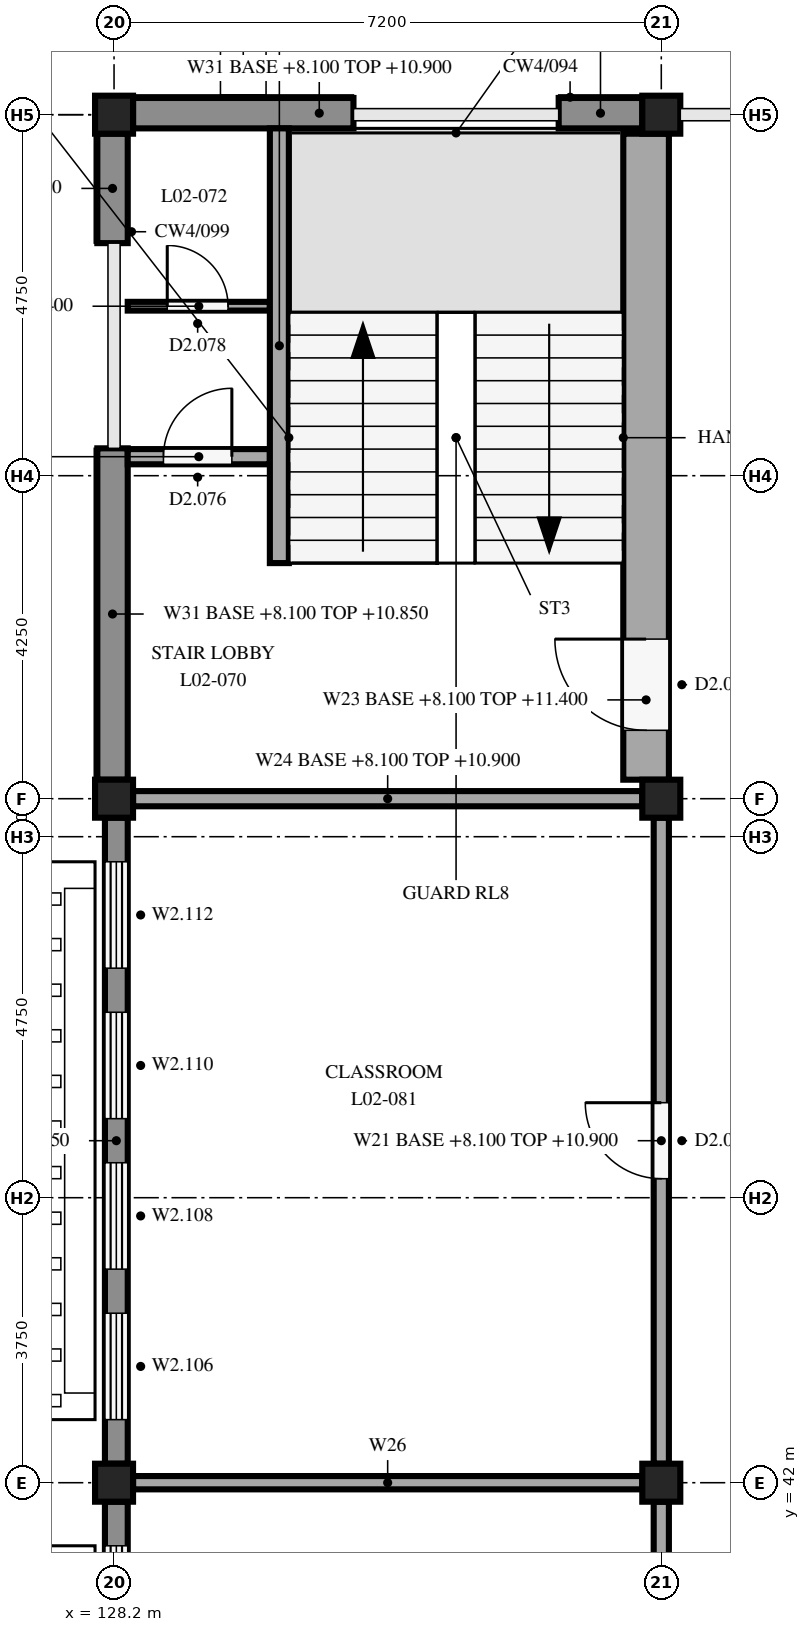
"""IFC4 building model, lengths in metres.
Left out: names, types, materials, properties, quantities, classifications, styles, units other than length and angle.
Written with IfcOpenShell. Run it as: python <this file> out.ifc"""

import sys

from ifc_helpers import new_model, si_unit, direction, frame, frame_2d, origin, origin_2d, place, context, subcontext, project, spatial, rectangle, extrude, element, fill, save


model = new_model("IFC4")
c1 = context("Model", 3, precision=1e-05, world=origin(), true_north=direction((0.0, 1.0)))
c2 = subcontext(c1, "Body", "Model", "MODEL_VIEW")
j1 = project(units=[si_unit("LENGTHUNIT", "METRE"), si_unit("PLANEANGLEUNIT", "RADIAN")], contexts=[c1])
p1 = place(None, origin())
s1 = spatial("IfcSite", under=j1, at=p1, CompositionType="ELEMENT")
p2 = place(p1, origin())
s2 = spatial("IfcBuilding", under=s1, at=p2, CompositionType="ELEMENT")
p3 = place(p2, frame((0.0, 0.0, 8.1)))
s3 = spatial("IfcBuildingStorey", under=s2, at=p3, CompositionType="ELEMENT", Elevation=8.1)
for number, where, z_axis, x_axis in (
    (1, (128.2, 42.0, 0.0), (0.0, 0.0, 1.0), (1.0, 0.0, 0.0)),
    (2, (128.2, 51.0, 0.0), (0.0, 0.0, 1.0), (1.0, 0.0, 0.0)),
    (3, (128.2, 60.0, 0.0), (0.0, 0.0, 1.0), (1.0, 0.0, 0.0)),
    (4, (135.4, 42.0, 0.0), (0.0, 0.0, 1.0), (1.0, 0.0, 0.0)),
    (5, (135.4, 51.0, 0.0), (0.0, 0.0, 1.0), (1.0, 0.0, 0.0)),
    (6, (135.4, 60.0, 0.0), (0.0, 0.0, 1.0), (1.0, 0.0, 0.0)),
):
    element("IfcColumn", number, at=place(p3, frame(where, z_axis=z_axis, x_axis=x_axis)), inside=s3, PredefinedType="COLUMN", context=c2, shape_type="SweptSolid", body=[
        extrude(rectangle(XDim=0.5, YDim=0.5, at=origin_2d()), origin(), (0.0, 0.0, 1.0), 3.3),
    ])
p4 = place(p3, frame((128.23, 33.25, 0.0), z_axis=(0.0, 0.0, 1.0), x_axis=(0.0, 1.0, 0.0)))
e7 = element("IfcWall", 7, at=p4, inside=s3, PredefinedType="STANDARD", context=c2, shape_type="SweptSolid", body=[
    extrude(rectangle(XDim=8.5, YDim=0.3, at=frame_2d((4.25, 0.0))), origin(), (0.0, 0.0, 1.0), 2.75),
])
p5 = place(p4, frame((0.58, 0.0, 0.6)))
e8 = element("IfcOpeningElement", 8, at=p5, cuts=e7, PredefinedType="OPENING", context=c2, shape_type="SweptSolid", body=[
    extrude(rectangle(XDim=1.4, YDim=2.1, at=frame_2d((0.7, 1.05))), frame((0.0, 0.16, 0.0), z_axis=(0.0, -1.0, 0.0), x_axis=(1.0, 0.0, 0.0)), (0.0, 0.0, 1.0), 0.32),
])
p6 = place(p4, frame((2.56, 0.0, 0.6)))
e9 = element("IfcOpeningElement", 9, at=p6, cuts=e7, PredefinedType="OPENING", context=c2, shape_type="SweptSolid", body=[
    extrude(rectangle(XDim=1.4, YDim=2.1, at=frame_2d((0.7, 1.05))), frame((0.0, 0.16, 0.0), z_axis=(0.0, -1.0, 0.0), x_axis=(1.0, 0.0, 0.0)), (0.0, 0.0, 1.0), 0.32),
])
p7 = place(p4, frame((4.54, 0.0, 0.6)))
e10 = element("IfcOpeningElement", 10, at=p7, cuts=e7, PredefinedType="OPENING", context=c2, shape_type="SweptSolid", body=[
    extrude(rectangle(XDim=1.4, YDim=2.1, at=frame_2d((0.7, 1.05))), frame((0.0, 0.16, 0.0), z_axis=(0.0, -1.0, 0.0), x_axis=(1.0, 0.0, 0.0)), (0.0, 0.0, 1.0), 0.32),
])
p8 = place(p4, frame((6.52, 0.0, 0.6)))
e11 = element("IfcOpeningElement", 11, at=p8, cuts=e7, PredefinedType="OPENING", context=c2, shape_type="SweptSolid", body=[
    extrude(rectangle(XDim=1.4, YDim=2.1, at=frame_2d((0.7, 1.05))), frame((0.0, 0.16, 0.0), z_axis=(0.0, -1.0, 0.0), x_axis=(1.0, 0.0, 0.0)), (0.0, 0.0, 1.0), 0.32),
])
p9 = place(p3, frame((128.23, 42.25, 0.0), z_axis=(0.0, 0.0, 1.0), x_axis=(0.0, 1.0, 0.0)))
e12 = element("IfcWall", 12, at=p9, inside=s3, PredefinedType="STANDARD", context=c2, shape_type="SweptSolid", body=[
    extrude(rectangle(XDim=8.5, YDim=0.3, at=frame_2d((4.25, 0.0))), origin(), (0.0, 0.0, 1.0), 2.75),
])
p10 = place(p9, frame((0.58, 0.0, 0.6)))
e13 = element("IfcOpeningElement", 13, at=p10, cuts=e12, PredefinedType="OPENING", context=c2, shape_type="SweptSolid", body=[
    extrude(rectangle(XDim=1.4, YDim=2.1, at=frame_2d((0.7, 1.05))), frame((0.0, 0.16, 0.0), z_axis=(0.0, -1.0, 0.0), x_axis=(1.0, 0.0, 0.0)), (0.0, 0.0, 1.0), 0.32),
])
p11 = place(p9, frame((2.56, 0.0, 0.6)))
e14 = element("IfcOpeningElement", 14, at=p11, cuts=e12, PredefinedType="OPENING", context=c2, shape_type="SweptSolid", body=[
    extrude(rectangle(XDim=1.4, YDim=2.1, at=frame_2d((0.7, 1.05))), frame((0.0, 0.16, 0.0), z_axis=(0.0, -1.0, 0.0), x_axis=(1.0, 0.0, 0.0)), (0.0, 0.0, 1.0), 0.32),
])
p12 = place(p9, frame((4.54, 0.0, 0.6)))
e15 = element("IfcOpeningElement", 15, at=p12, cuts=e12, PredefinedType="OPENING", context=c2, shape_type="SweptSolid", body=[
    extrude(rectangle(XDim=1.4, YDim=2.1, at=frame_2d((0.7, 1.05))), frame((0.0, 0.16, 0.0), z_axis=(0.0, -1.0, 0.0), x_axis=(1.0, 0.0, 0.0)), (0.0, 0.0, 1.0), 0.32),
])
p13 = place(p9, frame((6.52, 0.0, 0.6)))
e16 = element("IfcOpeningElement", 16, at=p13, cuts=e12, PredefinedType="OPENING", context=c2, shape_type="SweptSolid", body=[
    extrude(rectangle(XDim=1.4, YDim=2.1, at=frame_2d((0.7, 1.05))), frame((0.0, 0.16, 0.0), z_axis=(0.0, -1.0, 0.0), x_axis=(1.0, 0.0, 0.0)), (0.0, 0.0, 1.0), 0.32),
])
p14 = place(p3, frame((128.18, 51.25, 0.0), z_axis=(0.0, 0.0, 1.0), x_axis=(0.0, 1.0, 0.0)))
e17 = element("IfcWall", 17, at=p14, inside=s3, PredefinedType="STANDARD", context=c2, shape_type="SweptSolid", body=[
    extrude(rectangle(XDim=4.36, YDim=0.4, at=frame_2d((2.18, 0.0))), origin(), (0.0, 0.0, 1.0), 2.75),
])
p15 = place(p3, frame((128.18, 58.31, 0.0), z_axis=(0.0, 0.0, 1.0), x_axis=(0.0, 1.0, 0.0)))
e18 = element("IfcWall", 18, at=p15, inside=s3, PredefinedType="STANDARD", context=c2, shape_type="SweptSolid", body=[
    extrude(rectangle(XDim=1.44, YDim=0.4, at=frame_2d((0.72, 0.0))), origin(), (0.0, 0.0, 1.0), 2.75),
])
p16 = place(p3, frame((128.45, 60.02, 0.0), z_axis=(0.0, 0.0, 1.0), x_axis=(1.0, 0.0, 0.0)))
e19 = element("IfcWall", 19, at=p16, inside=s3, PredefinedType="STANDARD", context=c2, shape_type="SweptSolid", body=[
    extrude(rectangle(XDim=2.9, YDim=0.4, at=frame_2d((1.45, 0.0))), origin(), (0.0, 0.0, 1.0), 2.8),
])
p17 = place(p3, frame((134.05, 60.02, 0.0), z_axis=(0.0, 0.0, 1.0), x_axis=(1.0, 0.0, 0.0)))
e20 = element("IfcWall", 20, at=p17, inside=s3, PredefinedType="STANDARD", context=c2, shape_type="SweptSolid", body=[
    extrude(rectangle(XDim=1.1, YDim=0.4, at=frame_2d((0.55, 0.0))), origin(), (0.0, 0.0, 1.0), 2.8),
])
p18 = place(p3, frame((130.375, 54.1, 0.0), z_axis=(0.0, 0.0, 1.0), x_axis=(0.0, 1.0, 0.0)))
e21 = element("IfcWall", 21, at=p18, inside=s3, PredefinedType="SOLIDWALL", context=c2, shape_type="SweptSolid", body=[
    extrude(rectangle(XDim=5.72, YDim=0.25, at=frame_2d((2.86, 0.0))), origin(), (0.0, 0.0, 1.0), 3.3),
])
p19 = place(p3, frame((135.2, 51.25, 0.0), z_axis=(0.0, 0.0, 1.0), x_axis=(0.0, 1.0, 0.0)))
e22 = element("IfcWall", 22, at=p19, inside=s3, PredefinedType="SOLIDWALL", context=c2, shape_type="SweptSolid", body=[
    extrude(rectangle(XDim=8.5, YDim=0.6, at=frame_2d((4.25, 0.0))), origin(), (0.0, 0.0, 1.0), 3.3),
])
p20 = place(p19, frame((0.65, 0.0, 0.0)))
e23 = element("IfcOpeningElement", 23, at=p20, cuts=e22, PredefinedType="OPENING", context=c2, shape_type="SweptSolid", body=[
    extrude(rectangle(XDim=1.2, YDim=2.1, at=frame_2d((0.6, 1.05))), frame((0.0, 0.31, 0.0), z_axis=(0.0, -1.0, 0.0), x_axis=(1.0, 0.0, 0.0)), (0.0, 0.0, 1.0), 0.62),
])
p21 = place(p3, frame((128.38, 55.5, 0.0), z_axis=(0.0, 0.0, 1.0), x_axis=(1.0, 0.0, 0.0)))
e24 = element("IfcWall", 24, at=p21, inside=s3, PredefinedType="SOLIDWALL", context=c2, shape_type="SweptSolid", body=[
    extrude(rectangle(XDim=1.87, YDim=0.2, at=frame_2d((0.935, 0.0))), origin(), (0.0, 0.0, 1.0), 3.3),
])
p22 = place(p21, frame((0.47, 0.0, 0.0)))
e25 = element("IfcOpeningElement", 25, at=p22, cuts=e24, PredefinedType="OPENING", context=c2, shape_type="SweptSolid", body=[
    extrude(rectangle(XDim=0.9, YDim=2.1, at=frame_2d((0.45, 1.05))), frame((0.0, 0.11, 0.0), z_axis=(0.0, -1.0, 0.0), x_axis=(1.0, 0.0, 0.0)), (0.0, 0.0, 1.0), 0.22),
])
p23 = place(p3, frame((128.38, 57.48, 0.0), z_axis=(0.0, 0.0, 1.0), x_axis=(1.0, 0.0, 0.0)))
e26 = element("IfcWall", 26, at=p23, inside=s3, PredefinedType="PARTITIONING", context=c2, shape_type="SweptSolid", body=[
    extrude(rectangle(XDim=1.87, YDim=0.115, at=frame_2d((0.935, 0.0))), origin(), (0.0, 0.0, 1.0), 3.3),
])
p24 = place(p23, frame((0.52, 0.0, 0.0)))
e27 = element("IfcOpeningElement", 27, at=p24, cuts=e26, PredefinedType="OPENING", context=c2, shape_type="SweptSolid", body=[
    extrude(rectangle(XDim=0.8, YDim=2.1, at=frame_2d((0.4, 1.05))), frame((0.0, 0.067, 0.0), z_axis=(0.0, -1.0, 0.0), x_axis=(1.0, 0.0, 0.0)), (0.0, 0.0, 1.0), 0.135),
])
p25 = place(p3, frame((128.45, 51.0, 0.0), z_axis=(0.0, 0.0, 1.0), x_axis=(1.0, 0.0, 0.0)))
e28 = element("IfcWall", 28, at=p25, inside=s3, PredefinedType="SOLIDWALL", context=c2, shape_type="SweptSolid", body=[
    extrude(rectangle(XDim=6.7, YDim=0.2, at=frame_2d((3.35, 0.0))), origin(), (0.0, 0.0, 1.0), 2.8),
])
p26 = place(p3, frame((135.4, 33.25, 0.0), z_axis=(0.0, 0.0, 1.0), x_axis=(0.0, 1.0, 0.0)))
e29 = element("IfcWall", 29, at=p26, inside=s3, PredefinedType="PARTITIONING", context=c2, shape_type="SweptSolid", body=[
    extrude(rectangle(XDim=8.5, YDim=0.2, at=frame_2d((4.25, 0.0))), origin(), (0.0, 0.0, 1.0), 2.8),
])
p27 = place(p26, frame((3.75, 0.0, 0.0)))
e30 = element("IfcOpeningElement", 30, at=p27, cuts=e29, PredefinedType="OPENING", context=c2, shape_type="SweptSolid", body=[
    extrude(rectangle(XDim=1.0, YDim=2.1, at=frame_2d((0.5, 1.05))), frame((0.0, 0.11, 0.0), z_axis=(0.0, -1.0, 0.0), x_axis=(1.0, 0.0, 0.0)), (0.0, 0.0, 1.0), 0.22),
])
p28 = place(p3, frame((135.4, 42.25, 0.0), z_axis=(0.0, 0.0, 1.0), x_axis=(0.0, 1.0, 0.0)))
e31 = element("IfcWall", 31, at=p28, inside=s3, PredefinedType="PARTITIONING", context=c2, shape_type="SweptSolid", body=[
    extrude(rectangle(XDim=8.5, YDim=0.2, at=frame_2d((4.25, 0.0))), origin(), (0.0, 0.0, 1.0), 2.8),
])
p29 = place(p28, frame((3.75, 0.0, 0.0)))
e32 = element("IfcOpeningElement", 32, at=p29, cuts=e31, PredefinedType="OPENING", context=c2, shape_type="SweptSolid", body=[
    extrude(rectangle(XDim=1.0, YDim=2.1, at=frame_2d((0.5, 1.05))), frame((0.0, 0.11, 0.0), z_axis=(0.0, -1.0, 0.0), x_axis=(1.0, 0.0, 0.0)), (0.0, 0.0, 1.0), 0.22),
])
p30 = place(p3, frame((128.45, 42.0, 0.0), z_axis=(0.0, 0.0, 1.0), x_axis=(1.0, 0.0, 0.0)))
e33 = element("IfcWall", 33, at=p30, inside=s3, PredefinedType="PARTITIONING", context=c2, shape_type="SweptSolid", body=[
    extrude(rectangle(XDim=6.7, YDim=0.175, at=frame_2d((3.35, 0.0))), origin(), (0.0, 0.0, 1.0), 2.8),
])
p31 = place(p8, origin())
e34 = element("IfcWindow", 34, at=p31, inside=s3, PartitioningType="DOUBLE_PANEL_VERTICAL", PredefinedType="WINDOW", context=c2, shape_type="SweptSolid", body=[
    extrude(rectangle(XDim=1.4, YDim=2.1, at=frame_2d((0.7, 1.05))), frame((0.0, 0.03, 0.0), z_axis=(0.0, -1.0, 0.0), x_axis=(1.0, 0.0, 0.0)), (0.0, 0.0, 1.0), 0.06),
])
fill(e11, e34)
p32 = place(p10, origin())
e35 = element("IfcWindow", 35, at=p32, inside=s3, PartitioningType="DOUBLE_PANEL_VERTICAL", PredefinedType="WINDOW", context=c2, shape_type="SweptSolid", body=[
    extrude(rectangle(XDim=1.4, YDim=2.1, at=frame_2d((0.7, 1.05))), frame((0.0, 0.03, 0.0), z_axis=(0.0, -1.0, 0.0), x_axis=(1.0, 0.0, 0.0)), (0.0, 0.0, 1.0), 0.06),
])
fill(e13, e35)
p33 = place(p11, origin())
e36 = element("IfcWindow", 36, at=p33, inside=s3, PartitioningType="DOUBLE_PANEL_VERTICAL", PredefinedType="WINDOW", context=c2, shape_type="SweptSolid", body=[
    extrude(rectangle(XDim=1.4, YDim=2.1, at=frame_2d((0.7, 1.05))), frame((0.0, 0.03, 0.0), z_axis=(0.0, -1.0, 0.0), x_axis=(1.0, 0.0, 0.0)), (0.0, 0.0, 1.0), 0.06),
])
fill(e14, e36)
p34 = place(p12, origin())
e37 = element("IfcWindow", 37, at=p34, inside=s3, PartitioningType="DOUBLE_PANEL_VERTICAL", PredefinedType="WINDOW", context=c2, shape_type="SweptSolid", body=[
    extrude(rectangle(XDim=1.4, YDim=2.1, at=frame_2d((0.7, 1.05))), frame((0.0, 0.03, 0.0), z_axis=(0.0, -1.0, 0.0), x_axis=(1.0, 0.0, 0.0)), (0.0, 0.0, 1.0), 0.06),
])
fill(e15, e37)
p35 = place(p13, origin())
e38 = element("IfcWindow", 38, at=p35, inside=s3, PartitioningType="DOUBLE_PANEL_VERTICAL", PredefinedType="WINDOW", context=c2, shape_type="SweptSolid", body=[
    extrude(rectangle(XDim=1.4, YDim=2.1, at=frame_2d((0.7, 1.05))), frame((0.0, 0.03, 0.0), z_axis=(0.0, -1.0, 0.0), x_axis=(1.0, 0.0, 0.0)), (0.0, 0.0, 1.0), 0.06),
])
fill(e16, e38)
p36 = place(p20, origin())
e39 = element("IfcDoor", 39, at=p36, inside=s3, OperationType="SINGLE_SWING_RIGHT", PredefinedType="DOOR", context=c2, shape_type="SweptSolid", body=[
    extrude(rectangle(XDim=1.2, YDim=2.1, at=frame_2d((0.6, 1.05))), frame((0.0, 0.025, 0.0), z_axis=(0.0, -1.0, 0.0), x_axis=(1.0, 0.0, 0.0)), (0.0, 0.0, 1.0), 0.05),
])
fill(e23, e39)
p37 = place(p22, origin())
e40 = element("IfcDoor", 40, at=p37, inside=s3, OperationType="SINGLE_SWING_RIGHT", PredefinedType="DOOR", context=c2, shape_type="SweptSolid", body=[
    extrude(rectangle(XDim=0.9, YDim=2.1, at=frame_2d((0.45, 1.05))), frame((0.0, 0.025, 0.0), z_axis=(0.0, -1.0, 0.0), x_axis=(1.0, 0.0, 0.0)), (0.0, 0.0, 1.0), 0.05),
])
fill(e25, e40)
p38 = place(p24, origin())
e41 = element("IfcDoor", 41, at=p38, inside=s3, OperationType="SINGLE_SWING_LEFT", PredefinedType="DOOR", context=c2, shape_type="SweptSolid", body=[
    extrude(rectangle(XDim=0.8, YDim=2.1, at=frame_2d((0.4, 1.05))), frame((0.0, 0.025, 0.0), z_axis=(0.0, -1.0, 0.0), x_axis=(1.0, 0.0, 0.0)), (0.0, 0.0, 1.0), 0.05),
])
fill(e27, e41)
p39 = place(p29, origin())
e42 = element("IfcDoor", 42, at=p39, inside=s3, OperationType="SINGLE_SWING_RIGHT", PredefinedType="DOOR", context=c2, shape_type="SweptSolid", body=[
    extrude(rectangle(XDim=1.0, YDim=2.1, at=frame_2d((0.5, 1.05))), frame((0.0, 0.025, 0.0), z_axis=(0.0, -1.0, 0.0), x_axis=(1.0, 0.0, 0.0)), (0.0, 0.0, 1.0), 0.05),
])
fill(e32, e42)
save(model, sys.argv[1])
